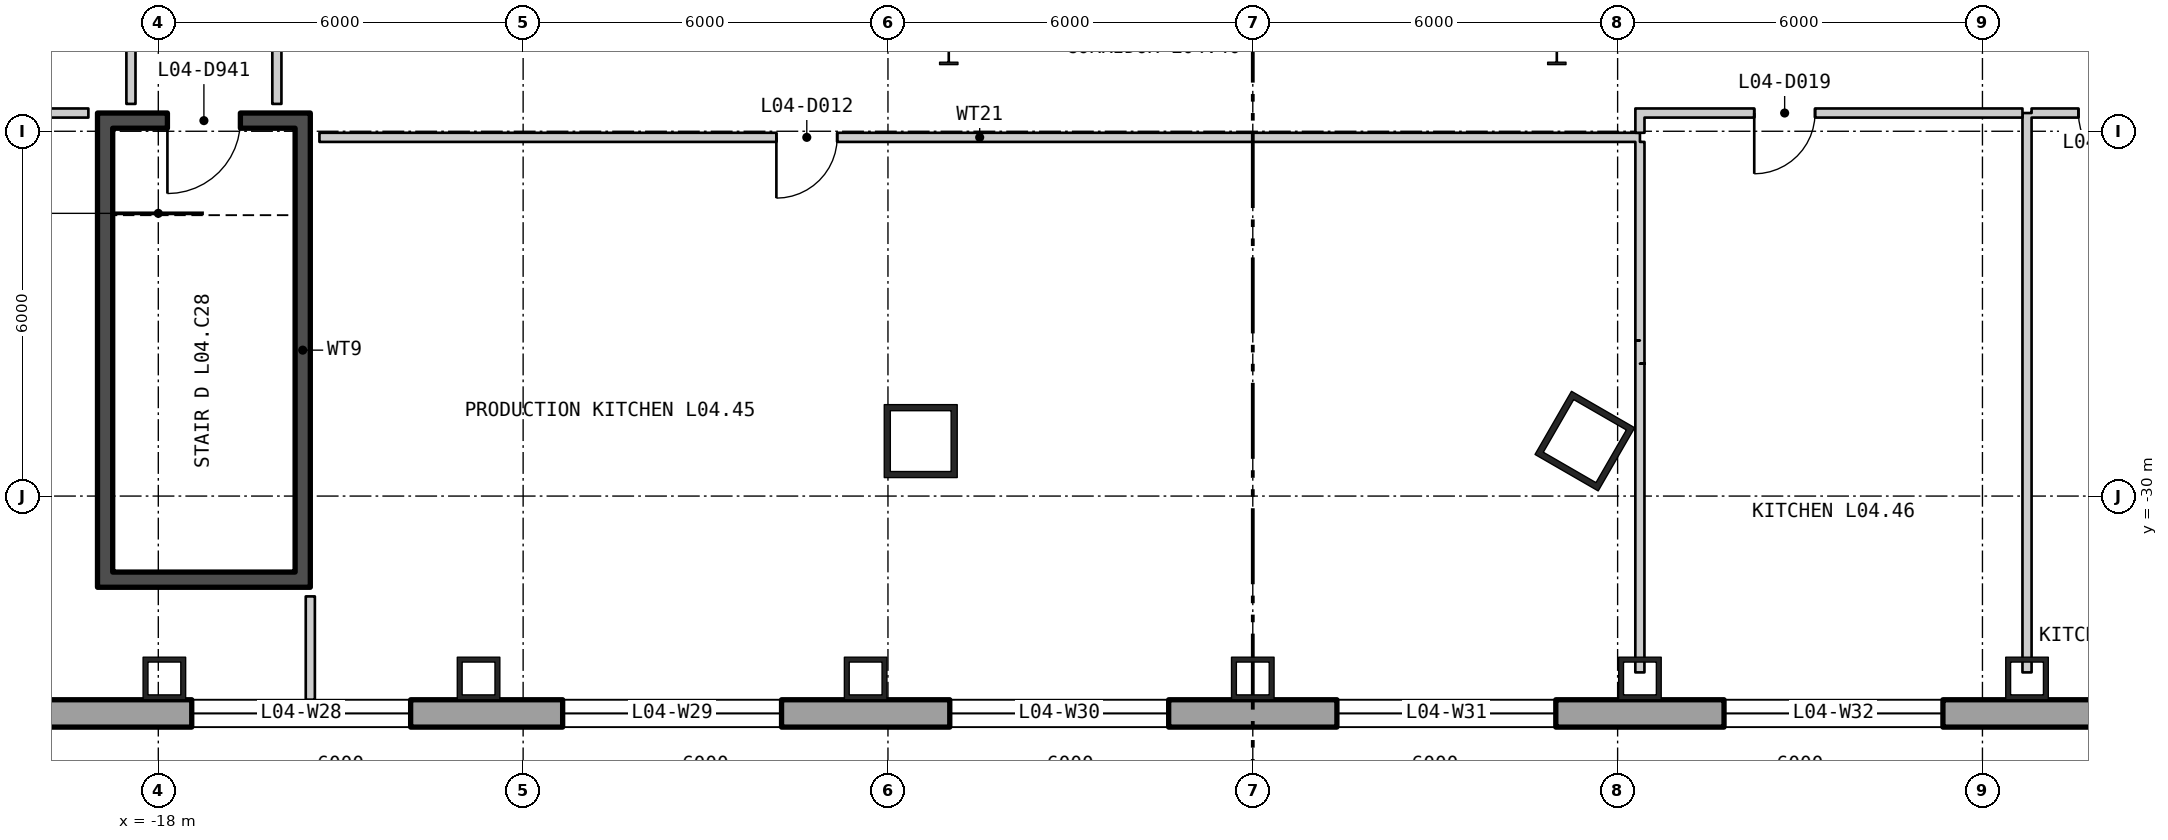
"""IFC4 building model, lengths in metres.
Left out: names, types, materials, properties, quantities, classifications, styles, units other than length and angle.
Written with IfcOpenShell. Run it as: python <this file> out.ifc"""

import sys

from ifc_helpers import new_model, si_unit, direction, frame, frame_2d, origin, origin_2d, place, context, subcontext, project, spatial, polyline, rectangle, hollow_rectangle, i_section, outline, extrude, element, fill, save


model = new_model("IFC4")
c1 = context("Model", 3, precision=1e-05, world=origin(), true_north=direction((0.0, 1.0)))
c2 = subcontext(c1, "Body", "Model", "MODEL_VIEW")
j1 = project(units=[si_unit("LENGTHUNIT", "METRE"), si_unit("PLANEANGLEUNIT", "RADIAN")], contexts=[c1])
p1 = place(None, origin())
s1 = spatial("IfcSite", under=j1, at=p1, CompositionType="ELEMENT")
p2 = place(p1, origin())
s2 = spatial("IfcBuilding", under=s1, at=p2, CompositionType="ELEMENT")
p3 = place(p2, frame((0.0, 0.0, 23.7)))
s3 = spatial("IfcBuildingStorey", under=s2, at=p3, CompositionType="ELEMENT", Elevation=23.7)
for number, where, z_axis, x_axis in (
    (1, (-5.461, -29.096, 0.0), (0.0, 0.0, 1.0), (1.0, 0.0, 0.0)),
    (2, (5.461, -29.096, 0.0), (0.0, 0.0, 1.0), (0.5, 0.866, 0.0)),
):
    element("IfcColumn", number, at=place(p3, frame(where, z_axis=z_axis, x_axis=x_axis)), inside=s3, PredefinedType="COLUMN", context=c2, shape_type="SweptSolid", body=[
        extrude(hollow_rectangle(XDim=1.2, YDim=1.2, WallThickness=0.1, at=origin_2d()), origin(), (0.0, 0.0, 1.0), 5.1),
    ])
for number, where, z_axis, x_axis in (
    (3, (5.0, -22.4, 0.0), (0.0, 0.0, 1.0), (1.0, 0.0, 0.0)),
    (4, (-5.0, -22.4, 0.0), (0.0, 0.0, 1.0), (1.0, 0.0, 0.0)),
):
    element("IfcColumn", number, at=place(p3, frame(where, z_axis=z_axis, x_axis=x_axis)), inside=s3, PredefinedType="COLUMN", context=c2, shape_type="SweptSolid", body=[
        extrude(i_section(OverallWidth=0.302, OverallDepth=1.008, WebThickness=0.021, FlangeThickness=0.04, at=origin_2d()), origin(), (0.0, 0.0, 1.0), 5.1),
    ])
for number, where, z_axis, x_axis in (
    (5, (-17.9, -33.0, 0.0), (0.0, 0.0, 1.0), (1.0, 0.0, 0.0)),
    (6, (-12.733, -33.0, 0.0), (0.0, 0.0, 1.0), (1.0, 0.0, 0.0)),
    (7, (-6.367, -33.0, 0.0), (0.0, 0.0, 1.0), (1.0, 0.0, 0.0)),
    (8, (0.0, -33.0, 0.0), (0.0, 0.0, 1.0), (1.0, 0.0, 0.0)),
    (9, (6.367, -33.0, 0.0), (0.0, 0.0, 1.0), (1.0, 0.0, 0.0)),
    (10, (12.733, -33.0, 0.0), (0.0, 0.0, 1.0), (1.0, 0.0, 0.0)),
):
    element("IfcColumn", number, at=place(p3, frame(where, z_axis=z_axis, x_axis=x_axis)), inside=s3, PredefinedType="COLUMN", context=c2, shape_type="SweptSolid", body=[
        extrude(hollow_rectangle(XDim=0.7, YDim=0.7, WallThickness=0.08, at=origin_2d()), origin(), (0.0, 0.0, 1.0), 4.85),
    ])
p4 = place(p3, frame((-38.775, -33.575, -0.4), z_axis=(0.0, 0.0, 1.0), x_axis=(1.0, 0.0, 0.0)))
e11 = element("IfcWall", 11, at=p4, inside=s3, PredefinedType="SOLIDWALL", context=c2, shape_type="SweptSolid", body=[
    extrude(outline(polyline([(-0.225, -0.225), (77.775, -0.225), (77.325, 0.225), (0.225, 0.225), (-0.225, -0.225)])), origin(), (0.0, 0.0, 1.0), 5.1),
])
p5 = place(p4, frame((1.958, 0.0, 1.3)))
e12 = element("IfcOpeningElement", 12, at=p5, cuts=e11, PredefinedType="OPENING", context=c2, shape_type="SweptSolid", body=[
    extrude(rectangle(XDim=3.6, YDim=3.2, at=frame_2d((1.8, 1.6))), frame((0.0, 0.235, 0.0), z_axis=(0.0, -1.0, 0.0), x_axis=(1.0, 0.0, 0.0)), (0.0, 0.0, 1.0), 0.47),
])
p6 = place(p4, frame((8.325, 0.0, 1.3)))
e13 = element("IfcOpeningElement", 13, at=p6, cuts=e11, PredefinedType="OPENING", context=c2, shape_type="SweptSolid", body=[
    extrude(rectangle(XDim=3.6, YDim=3.2, at=frame_2d((1.8, 1.6))), frame((0.0, 0.235, 0.0), z_axis=(0.0, -1.0, 0.0), x_axis=(1.0, 0.0, 0.0)), (0.0, 0.0, 1.0), 0.47),
])
p7 = place(p4, frame((14.692, 0.0, 1.3)))
e14 = element("IfcOpeningElement", 14, at=p7, cuts=e11, PredefinedType="OPENING", context=c2, shape_type="SweptSolid", body=[
    extrude(rectangle(XDim=3.6, YDim=3.2, at=frame_2d((1.8, 1.6))), frame((0.0, 0.235, 0.0), z_axis=(0.0, -1.0, 0.0), x_axis=(1.0, 0.0, 0.0)), (0.0, 0.0, 1.0), 0.47),
])
p8 = place(p4, frame((21.325, 0.0, 1.3)))
e15 = element("IfcOpeningElement", 15, at=p8, cuts=e11, PredefinedType="OPENING", context=c2, shape_type="SweptSolid", body=[
    extrude(rectangle(XDim=3.6, YDim=3.2, at=frame_2d((1.8, 1.6))), frame((0.0, 0.235, 0.0), z_axis=(0.0, -1.0, 0.0), x_axis=(1.0, 0.0, 0.0)), (0.0, 0.0, 1.0), 0.47),
])
p9 = place(p4, frame((27.425, 0.0, 1.3)))
e16 = element("IfcOpeningElement", 16, at=p9, cuts=e11, PredefinedType="OPENING", context=c2, shape_type="SweptSolid", body=[
    extrude(rectangle(XDim=3.6, YDim=3.2, at=frame_2d((1.8, 1.6))), frame((0.0, 0.235, 0.0), z_axis=(0.0, -1.0, 0.0), x_axis=(1.0, 0.0, 0.0)), (0.0, 0.0, 1.0), 0.47),
])
p10 = place(p4, frame((33.792, 0.0, 1.3)))
e17 = element("IfcOpeningElement", 17, at=p10, cuts=e11, PredefinedType="OPENING", context=c2, shape_type="SweptSolid", body=[
    extrude(rectangle(XDim=3.6, YDim=3.2, at=frame_2d((1.8, 1.6))), frame((0.0, 0.235, 0.0), z_axis=(0.0, -1.0, 0.0), x_axis=(1.0, 0.0, 0.0)), (0.0, 0.0, 1.0), 0.47),
])
p11 = place(p4, frame((40.158, 0.0, 1.3)))
e18 = element("IfcOpeningElement", 18, at=p11, cuts=e11, PredefinedType="OPENING", context=c2, shape_type="SweptSolid", body=[
    extrude(rectangle(XDim=3.6, YDim=3.2, at=frame_2d((1.8, 1.6))), frame((0.0, 0.235, 0.0), z_axis=(0.0, -1.0, 0.0), x_axis=(1.0, 0.0, 0.0)), (0.0, 0.0, 1.0), 0.47),
])
p12 = place(p4, frame((46.525, 0.0, 1.3)))
e19 = element("IfcOpeningElement", 19, at=p12, cuts=e11, PredefinedType="OPENING", context=c2, shape_type="SweptSolid", body=[
    extrude(rectangle(XDim=3.6, YDim=3.2, at=frame_2d((1.8, 1.6))), frame((0.0, 0.235, 0.0), z_axis=(0.0, -1.0, 0.0), x_axis=(1.0, 0.0, 0.0)), (0.0, 0.0, 1.0), 0.47),
])
p13 = place(p4, frame((52.625, 0.0, 1.3)))
e20 = element("IfcOpeningElement", 20, at=p13, cuts=e11, PredefinedType="OPENING", context=c2, shape_type="SweptSolid", body=[
    extrude(rectangle(XDim=3.6, YDim=3.2, at=frame_2d((1.8, 1.6))), frame((0.0, 0.235, 0.0), z_axis=(0.0, -1.0, 0.0), x_axis=(1.0, 0.0, 0.0)), (0.0, 0.0, 1.0), 0.47),
])
p14 = place(p4, frame((59.258, 0.0, 1.3)))
e21 = element("IfcOpeningElement", 21, at=p14, cuts=e11, PredefinedType="OPENING", context=c2, shape_type="SweptSolid", body=[
    extrude(rectangle(XDim=3.6, YDim=3.2, at=frame_2d((1.8, 1.6))), frame((0.0, 0.235, 0.0), z_axis=(0.0, -1.0, 0.0), x_axis=(1.0, 0.0, 0.0)), (0.0, 0.0, 1.0), 0.47),
])
p15 = place(p4, frame((65.625, 0.0, 1.3)))
e22 = element("IfcOpeningElement", 22, at=p15, cuts=e11, PredefinedType="OPENING", context=c2, shape_type="SweptSolid", body=[
    extrude(rectangle(XDim=3.6, YDim=3.2, at=frame_2d((1.8, 1.6))), frame((0.0, 0.235, 0.0), z_axis=(0.0, -1.0, 0.0), x_axis=(1.0, 0.0, 0.0)), (0.0, 0.0, 1.0), 0.47),
])
p16 = place(p4, frame((71.992, 0.0, 1.3)))
e23 = element("IfcOpeningElement", 23, at=p16, cuts=e11, PredefinedType="OPENING", context=c2, shape_type="SweptSolid", body=[
    extrude(rectangle(XDim=3.6, YDim=3.2, at=frame_2d((1.8, 1.6))), frame((0.0, 0.235, 0.0), z_axis=(0.0, -1.0, 0.0), x_axis=(1.0, 0.0, 0.0)), (0.0, 0.0, 1.0), 0.47),
])
for number, where, z_axis, x_axis in (
    (24, (-18.875, -31.25, 0.0), (0.0, 0.0, 1.0), (0.0, 1.0, 0.0)),
    (25, (-15.625, -31.25, 0.0), (0.0, 0.0, 1.0), (0.0, 1.0, 0.0)),
):
    element("IfcWall", number, at=place(p3, frame(where, z_axis=z_axis, x_axis=x_axis)), inside=s3, PredefinedType="SHEAR", context=c2, shape_type="SweptSolid", body=[
        extrude(rectangle(XDim=7.3, YDim=0.25, at=frame_2d((3.65, 0.0))), origin(), (0.0, 0.0, 1.0), 4.85),
    ])
p17 = place(p3, frame((-19.0, -31.375, 0.0), z_axis=(0.0, 0.0, 1.0), x_axis=(1.0, 0.0, 0.0)))
e26 = element("IfcWall", 26, at=p17, inside=s3, PredefinedType="SHEAR", context=c2, shape_type="SweptSolid", body=[
    extrude(rectangle(XDim=3.5, YDim=0.25, at=frame_2d((1.75, 0.0))), origin(), (0.0, 0.0, 1.0), 4.85),
])
p18 = place(p3, frame((-19.0, -23.825, 0.0), z_axis=(0.0, 0.0, 1.0), x_axis=(1.0, 0.0, 0.0)))
e27 = element("IfcWall", 27, at=p18, inside=s3, PredefinedType="SHEAR", context=c2, shape_type="SweptSolid", body=[
    extrude(rectangle(XDim=3.5, YDim=0.25, at=frame_2d((1.75, 0.0))), origin(), (0.0, 0.0, 1.0), 4.85),
])
p19 = place(p18, frame((1.15, 0.0, 0.0)))
e28 = element("IfcOpeningElement", 28, at=p19, cuts=e27, PredefinedType="OPENING", context=c2, shape_type="SweptSolid", body=[
    extrude(rectangle(XDim=1.2, YDim=2.1, at=frame_2d((0.6, 1.05))), frame((0.0, 0.135, 0.0), z_axis=(0.0, -1.0, 0.0), x_axis=(1.0, 0.0, 0.0)), (0.0, 0.0, 1.0), 0.27),
])
p20 = place(p3, frame((-19.825, -23.7, 0.0), z_axis=(0.0, 0.0, 1.0), x_axis=(1.0, 0.0, 0.0)))
e29 = element("IfcWall", 29, at=p20, inside=s3, PredefinedType="PARTITIONING", context=c2, shape_type="SweptSolid", body=[
    extrude(rectangle(XDim=0.675, YDim=0.15, at=frame_2d((0.338, 0.0))), origin(), (0.0, 0.0, 1.0), 4.85),
])
p21 = place(p3, frame((-18.45, -23.55, 0.0), z_axis=(0.0, 0.0, 1.0), x_axis=(0.0, 1.0, 0.0)))
e30 = element("IfcWall", 30, at=p21, inside=s3, PredefinedType="PARTITIONING", context=c2, shape_type="SweptSolid", body=[
    extrude(rectangle(XDim=2.2, YDim=0.15, at=frame_2d((1.1, 0.0))), origin(), (0.0, 0.0, 1.0), 4.85),
])
p22 = place(p21, frame((1.013, 0.0, 0.0)))
e31 = element("IfcOpeningElement", 31, at=p22, cuts=e30, PredefinedType="OPENING", context=c2, shape_type="SweptSolid", body=[
    extrude(rectangle(XDim=1.0, YDim=2.1, at=frame_2d((0.5, 1.05))), frame((0.0, 0.085, 0.0), z_axis=(0.0, -1.0, 0.0), x_axis=(1.0, 0.0, 0.0)), (0.0, 0.0, 1.0), 0.17),
])
p23 = place(p3, frame((-16.05, -23.55, 0.0), z_axis=(0.0, 0.0, 1.0), x_axis=(0.0, 1.0, 0.0)))
e32 = element("IfcWall", 32, at=p23, inside=s3, PredefinedType="PARTITIONING", context=c2, shape_type="SweptSolid", body=[
    extrude(rectangle(XDim=2.175, YDim=0.15, at=frame_2d((1.087, 0.0))), origin(), (0.0, 0.0, 1.0), 4.16),
])
p24 = place(p23, frame((1.063, 0.0, 0.0)))
e33 = element("IfcOpeningElement", 33, at=p24, cuts=e32, PredefinedType="OPENING", context=c2, shape_type="SweptSolid", body=[
    extrude(rectangle(XDim=1.0, YDim=2.1, at=frame_2d((0.5, 1.05))), frame((0.0, 0.085, 0.0), z_axis=(0.0, -1.0, 0.0), x_axis=(1.0, 0.0, 0.0)), (0.0, 0.0, 1.0), 0.17),
])
p25 = place(p3, frame((-15.5, -33.35, 0.0), z_axis=(0.0, 0.0, 1.0), x_axis=(0.0, 1.0, 0.0)))
e34 = element("IfcWall", 34, at=p25, inside=s3, PredefinedType="PARTITIONING", context=c2, shape_type="SweptSolid", body=[
    extrude(rectangle(XDim=1.7, YDim=0.15, at=frame_2d((0.85, 0.0))), origin(), (0.0, 0.0, 1.0), 4.85),
])
p26 = place(p3, frame((-15.35, -24.1, 0.0), z_axis=(0.0, 0.0, 1.0), x_axis=(1.0, 0.0, 0.0)))
e35 = element("IfcWall", 35, at=p26, inside=s3, PredefinedType="PARTITIONING", context=c2, shape_type="SweptSolid", body=[
    extrude(rectangle(XDim=21.717, YDim=0.15, at=frame_2d((10.858, 0.0))), origin(), (0.0, 0.0, 1.0), 4.85),
])
p27 = place(p26, frame((7.515, 0.0, 0.0)))
e36 = element("IfcOpeningElement", 36, at=p27, cuts=e35, PredefinedType="OPENING", context=c2, shape_type="SweptSolid", body=[
    extrude(rectangle(XDim=1.0, YDim=2.1, at=frame_2d((0.5, 1.05))), frame((0.0, 0.085, 0.0), z_axis=(0.0, -1.0, 0.0), x_axis=(1.0, 0.0, 0.0)), (0.0, 0.0, 1.0), 0.17),
])
p28 = place(p3, frame((6.366, -32.9, 0.0), z_axis=(0.0, 0.0, 1.0), x_axis=(0.000118156754, 0.999999993019, 0.0)))
e37 = element("IfcWall", 37, at=p28, inside=s3, PredefinedType="PARTITIONING", context=c2, shape_type="SweptSolid", body=[
    extrude(rectangle(XDim=5.078, YDim=0.15, at=frame_2d((2.539, 0.0))), origin(), (0.0, 0.0, 1.0), 4.25),
])
p29 = place(p3, frame((6.367, -27.822, 0.0), z_axis=(0.0, 0.0, 1.0), x_axis=(0.0, 1.0, 0.0)))
e38 = element("IfcWall", 38, at=p29, inside=s3, PredefinedType="PARTITIONING", context=c2, shape_type="SweptSolid", body=[
    extrude(rectangle(XDim=0.381, YDim=0.15, at=frame_2d((0.191, 0.0))), origin(), (0.0, 0.0, 1.0), 4.85),
])
p30 = place(p3, frame((6.367, -27.441, 0.0), z_axis=(0.0, 0.0, 1.0), x_axis=(0.000122473973, 0.9999999925, 0.0)))
e39 = element("IfcWall", 39, at=p30, inside=s3, PredefinedType="PARTITIONING", context=c2, shape_type="SweptSolid", body=[
    extrude(rectangle(XDim=3.266, YDim=0.15, at=frame_2d((1.633, 0.0))), origin(), (0.0, 0.0, 1.0), 4.25),
])
p31 = place(p3, frame((6.367, -24.025, 0.0), z_axis=(0.0, 0.0, 1.0), x_axis=(0.0, 1.0, 0.0)))
e40 = element("IfcWall", 40, at=p31, inside=s3, PredefinedType="PARTITIONING", context=c2, shape_type="SweptSolid", body=[
    extrude(rectangle(XDim=0.4, YDim=0.15, at=frame_2d((0.2, 0.0))), origin(), (0.0, 0.0, 1.0), 4.85),
])
p32 = place(p3, frame((6.442, -23.7, 0.0), z_axis=(0.0, 0.0, 1.0), x_axis=(1.0, 0.0, 0.0)))
e41 = element("IfcWall", 41, at=p32, inside=s3, PredefinedType="PARTITIONING", context=c2, shape_type="SweptSolid", body=[
    extrude(rectangle(XDim=6.216, YDim=0.15, at=frame_2d((3.108, 0.0))), origin(), (0.0, 0.0, 1.0), 4.85),
])
p33 = place(p32, frame((1.805, 0.0, 0.0)))
e42 = element("IfcOpeningElement", 42, at=p33, cuts=e41, PredefinedType="OPENING", context=c2, shape_type="SweptSolid", body=[
    extrude(rectangle(XDim=1.0, YDim=2.1, at=frame_2d((0.5, 1.05))), frame((0.0, 0.085, 0.0), z_axis=(0.0, -1.0, 0.0), x_axis=(1.0, 0.0, 0.0)), (0.0, 0.0, 1.0), 0.17),
])
p34 = place(p3, frame((12.733, -32.9, 0.0), z_axis=(0.0, 0.0, 1.0), x_axis=(0.0, 1.0, 0.0)))
e43 = element("IfcWall", 43, at=p34, inside=s3, PredefinedType="PARTITIONING", context=c2, shape_type="SweptSolid", body=[
    extrude(rectangle(XDim=9.2, YDim=0.15, at=frame_2d((4.6, 0.0))), origin(), (0.0, 0.0, 1.0), 4.16),
])
p35 = place(p3, frame((12.808, -23.7, 0.0), z_axis=(0.0, 0.0, 1.0), x_axis=(1.0, 0.0, 0.0)))
e44 = element("IfcWall", 44, at=p35, inside=s3, PredefinedType="PARTITIONING", context=c2, shape_type="SweptSolid", body=[
    extrude(rectangle(XDim=2.542, YDim=0.15, at=frame_2d((1.271, 0.0))), origin(), (0.0, 0.0, 1.0), 4.85),
])
p36 = place(p35, frame((0.771, 0.0, 0.0)))
e45 = element("IfcOpeningElement", 45, at=p36, cuts=e44, PredefinedType="OPENING", context=c2, shape_type="SweptSolid", body=[
    extrude(rectangle(XDim=1.0, YDim=2.1, at=frame_2d((0.5, 1.05))), frame((0.0, 0.085, 0.0), z_axis=(0.0, -1.0, 0.0), x_axis=(1.0, 0.0, 0.0)), (0.0, 0.0, 1.0), 0.17),
])
p37 = place(p8, origin())
e46 = element("IfcWindow", 46, at=p37, inside=s3, PartitioningType="SINGLE_PANEL", PredefinedType="WINDOW", context=c2, shape_type="SweptSolid", body=[
    extrude(rectangle(XDim=3.6, YDim=3.2, at=frame_2d((1.8, 1.6))), frame((0.0, 0.105, 0.0), z_axis=(0.0, -1.0, 0.0), x_axis=(1.0, 0.0, 0.0)), (0.0, 0.0, 1.0), 0.06),
])
fill(e15, e46)
p38 = place(p9, origin())
e47 = element("IfcWindow", 47, at=p38, inside=s3, PartitioningType="SINGLE_PANEL", PredefinedType="WINDOW", context=c2, shape_type="SweptSolid", body=[
    extrude(rectangle(XDim=3.6, YDim=3.2, at=frame_2d((1.8, 1.6))), frame((0.0, 0.105, 0.0), z_axis=(0.0, -1.0, 0.0), x_axis=(1.0, 0.0, 0.0)), (0.0, 0.0, 1.0), 0.06),
])
fill(e16, e47)
p39 = place(p10, origin())
e48 = element("IfcWindow", 48, at=p39, inside=s3, PartitioningType="SINGLE_PANEL", PredefinedType="WINDOW", context=c2, shape_type="SweptSolid", body=[
    extrude(rectangle(XDim=3.6, YDim=3.2, at=frame_2d((1.8, 1.6))), frame((0.0, 0.105, 0.0), z_axis=(0.0, -1.0, 0.0), x_axis=(1.0, 0.0, 0.0)), (0.0, 0.0, 1.0), 0.06),
])
fill(e17, e48)
p40 = place(p11, origin())
e49 = element("IfcWindow", 49, at=p40, inside=s3, PartitioningType="SINGLE_PANEL", PredefinedType="WINDOW", context=c2, shape_type="SweptSolid", body=[
    extrude(rectangle(XDim=3.6, YDim=3.2, at=frame_2d((1.8, 1.6))), frame((0.0, 0.105, 0.0), z_axis=(0.0, -1.0, 0.0), x_axis=(1.0, 0.0, 0.0)), (0.0, 0.0, 1.0), 0.06),
])
fill(e18, e49)
p41 = place(p12, origin())
e50 = element("IfcWindow", 50, at=p41, inside=s3, PartitioningType="SINGLE_PANEL", PredefinedType="WINDOW", context=c2, shape_type="SweptSolid", body=[
    extrude(rectangle(XDim=3.6, YDim=3.2, at=frame_2d((1.8, 1.6))), frame((0.0, 0.105, 0.0), z_axis=(0.0, -1.0, 0.0), x_axis=(1.0, 0.0, 0.0)), (0.0, 0.0, 1.0), 0.06),
])
fill(e19, e50)
p42 = place(p19, origin())
e51 = element("IfcDoor", 51, at=p42, inside=s3, OperationType="SINGLE_SWING_LEFT", PredefinedType="DOOR", context=c2, shape_type="SweptSolid", body=[
    extrude(rectangle(XDim=1.2, YDim=2.1, at=frame_2d((0.6, 1.05))), frame((0.0, 0.025, 0.0), z_axis=(0.0, -1.0, 0.0), x_axis=(1.0, 0.0, 0.0)), (0.0, 0.0, 1.0), 0.05),
])
fill(e28, e51)
p43 = place(p27, origin())
e52 = element("IfcDoor", 52, at=p43, inside=s3, OperationType="SINGLE_SWING_LEFT", PredefinedType="DOOR", context=c2, shape_type="SweptSolid", body=[
    extrude(rectangle(XDim=1.0, YDim=2.1, at=frame_2d((0.5, 1.05))), frame((0.0, 0.025, 0.0), z_axis=(0.0, -1.0, 0.0), x_axis=(1.0, 0.0, 0.0)), (0.0, 0.0, 1.0), 0.05),
])
fill(e36, e52)
p44 = place(p33, origin())
e53 = element("IfcDoor", 53, at=p44, inside=s3, OperationType="SINGLE_SWING_LEFT", PredefinedType="DOOR", context=c2, shape_type="SweptSolid", body=[
    extrude(rectangle(XDim=1.0, YDim=2.1, at=frame_2d((0.5, 1.05))), frame((0.0, 0.025, 0.0), z_axis=(0.0, -1.0, 0.0), x_axis=(1.0, 0.0, 0.0)), (0.0, 0.0, 1.0), 0.05),
])
fill(e42, e53)
p45 = place(p36, origin())
e54 = element("IfcDoor", 54, at=p45, inside=s3, OperationType="SINGLE_SWING_RIGHT", PredefinedType="DOOR", context=c2, shape_type="SweptSolid", body=[
    extrude(rectangle(XDim=1.0, YDim=2.1, at=frame_2d((0.5, 1.05))), frame((0.0, 0.025, 0.0), z_axis=(0.0, -1.0, 0.0), x_axis=(1.0, 0.0, 0.0)), (0.0, 0.0, 1.0), 0.05),
])
fill(e45, e54)
save(model, sys.argv[1])
